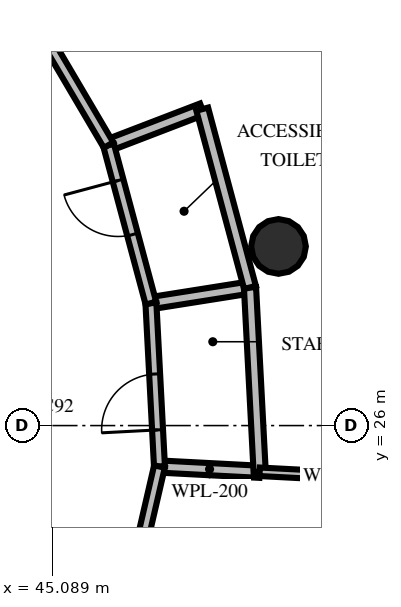
"""IFC4 building model, lengths in metres.
Left out: names, types, materials, properties, quantities, classifications, styles, units other than length and angle.
Written with IfcOpenShell. Run it as: python <this file> out.ifc"""

import sys

from ifc_helpers import new_model, si_unit, direction, frame, frame_2d, origin, origin_2d, place, context, subcontext, project, spatial, rectangle, circle, extrude, element, fill, save


model = new_model("IFC4")
c1 = context("Model", 3, precision=1e-05, world=origin(), true_north=direction((0.0, 1.0)))
c2 = subcontext(c1, "Body", "Model", "MODEL_VIEW")
j1 = project(units=[si_unit("LENGTHUNIT", "METRE"), si_unit("PLANEANGLEUNIT", "RADIAN")], contexts=[c1])
p1 = place(None, origin())
s1 = spatial("IfcSite", under=j1, at=p1, CompositionType="ELEMENT")
p2 = place(p1, origin())
s2 = spatial("IfcBuilding", under=s1, at=p2, CompositionType="ELEMENT")
p3 = place(p2, frame((0.0, 0.0, 266.4)))
s3 = spatial("IfcBuildingStorey", under=s2, at=p3, CompositionType="ELEMENT", Elevation=266.4)
p4 = place(p3, frame((48.81, 28.946, 0.0), z_axis=(0.0, 0.0, 1.0), x_axis=(1.0, 0.0, 0.0)))
e1 = element("IfcColumn", 1, at=p4, inside=s3, PredefinedType="COLUMN", context=c2, shape_type="SweptSolid", body=[
    extrude(circle(Radius=0.45, at=origin_2d()), origin(), (0.0, 0.0, 1.0), 3.6),
])
p5 = place(p3, frame((49.283, 20.423, 0.0), z_axis=(0.0, 0.0, 1.0), x_axis=(0.299202870459, 0.954189521169, 0.0)))
e2 = element("IfcWall", 2, at=p5, inside=s3, PredefinedType="SOLIDWALL", context=c2, shape_type="SweptSolid", body=[
    extrude(rectangle(XDim=7.115, YDim=0.3, at=frame_2d((3.558, 0.0))), origin(), (0.0, 0.0, 1.0), 2.76),
])
p6 = place(p5, frame((2.508, 0.0, 0.8)))
e3 = element("IfcOpeningElement", 3, at=p6, cuts=e2, PredefinedType="OPENING", context=c2, shape_type="SweptSolid", body=[
    extrude(rectangle(XDim=2.1, YDim=1.85, at=frame_2d((1.05, 0.925))), frame((0.0, 0.16, 0.0), z_axis=(0.0, -1.0, 0.0), x_axis=(1.0, 0.0, 0.0)), (0.0, 0.0, 1.0), 0.32),
])
p7 = place(p3, frame((46.852, 25.326, 0.0), z_axis=(0.0, 0.0, 1.0), x_axis=(0.998627214556, -0.052380209506, 0.0)))
e4 = element("IfcWall", 4, at=p7, inside=s3, PredefinedType="PLUMBINGWALL", context=c2, shape_type="SweptSolid", body=[
    extrude(rectangle(XDim=1.65, YDim=0.2, at=frame_2d((0.825, 0.0))), origin(), (0.0, 0.0, 1.0), 2.46),
])
p8 = place(p3, frame((46.711, 28.013, 0.0), z_axis=(0.0, 0.0, 1.0), x_axis=(0.987674038954, 0.156524735352, 0.0)))
e5 = element("IfcWall", 5, at=p8, inside=s3, PredefinedType="PLUMBINGWALL", context=c2, shape_type="SweptSolid", body=[
    extrude(rectangle(XDim=1.65, YDim=0.2, at=frame_2d((0.825, 0.0))), origin(), (0.0, 0.0, 1.0), 2.46),
])
p9 = place(p3, frame((48.5, 25.24, 0.0), z_axis=(0.0, 0.0, 1.0), x_axis=(-0.052276011793, 0.998632674506, 0.0)))
e6 = element("IfcWall", 6, at=p9, inside=s3, PredefinedType="PLUMBINGWALL", context=c2, shape_type="SweptSolid", body=[
    extrude(rectangle(XDim=3.036, YDim=0.2, at=frame_2d((1.518, 0.0))), origin(), (0.0, 0.0, 1.0), 2.46),
])
p10 = place(p3, frame((46.852, 25.326, 0.0), z_axis=(0.0, 0.0, 1.0), x_axis=(-0.052358796069, 0.998628337508, 0.0)))
e7 = element("IfcWall", 7, at=p10, inside=s3, PredefinedType="PARTITIONING", context=c2, shape_type="SweptSolid", body=[
    extrude(rectangle(XDim=2.69, YDim=0.18, at=frame_2d((1.345, 0.0))), origin(), (0.0, 0.0, 1.0), 2.46),
])
p11 = place(p10, frame((0.603, 0.0, 0.0)))
e8 = element("IfcOpeningElement", 8, at=p11, cuts=e7, PredefinedType="OPENING", context=c2, shape_type="SweptSolid", body=[
    extrude(rectangle(XDim=0.92, YDim=2.1, at=frame_2d((0.46, 1.05))), frame((0.0, 0.1, 0.0), z_axis=(0.0, -1.0, 0.0), x_axis=(1.0, 0.0, 0.0)), (0.0, 0.0, 1.0), 0.2),
])
p12 = place(p3, frame((46.015, 30.612, 0.0), z_axis=(0.0, 0.0, 1.0), x_axis=(0.933589438272, 0.358344472186, 0.0)))
e9 = element("IfcWall", 9, at=p12, inside=s3, PredefinedType="PLUMBINGWALL", context=c2, shape_type="SweptSolid", body=[
    extrude(rectangle(XDim=1.65, YDim=0.2, at=frame_2d((0.825, 0.0))), origin(), (0.0, 0.0, 1.0), 2.46),
])
p13 = place(p3, frame((48.341, 28.271, 0.0), z_axis=(0.0, 0.0, 1.0), x_axis=(-0.258813807271, 0.965927229747, 0.0)))
e10 = element("IfcWall", 10, at=p13, inside=s3, PredefinedType="PLUMBINGWALL", context=c2, shape_type="SweptSolid", body=[
    extrude(rectangle(XDim=3.036, YDim=0.2, at=frame_2d((1.518, 0.0))), origin(), (0.0, 0.0, 1.0), 2.46),
])
p14 = place(p3, frame((46.711, 28.013, 0.0), z_axis=(0.0, 0.0, 1.0), x_axis=(-0.258769343788, 0.965939142346, 0.0)))
e11 = element("IfcWall", 11, at=p14, inside=s3, PredefinedType="PARTITIONING", context=c2, shape_type="SweptSolid", body=[
    extrude(rectangle(XDim=2.691, YDim=0.18, at=frame_2d((1.345, 0.0))), origin(), (0.0, 0.0, 1.0), 2.46),
])
p15 = place(p14, frame((1.167, 0.0, 0.0)))
e12 = element("IfcOpeningElement", 12, at=p15, cuts=e11, PredefinedType="OPENING", context=c2, shape_type="SweptSolid", body=[
    extrude(rectangle(XDim=0.92, YDim=2.1, at=frame_2d((0.46, 1.05))), frame((0.0, 0.1, 0.0), z_axis=(0.0, -1.0, 0.0), x_axis=(1.0, 0.0, 0.0)), (0.0, 0.0, 1.0), 0.2),
])
p16 = place(p3, frame((48.5, 25.24, 0.0), z_axis=(0.0, 0.0, 1.0), x_axis=(0.998632746109, -0.052274643946, 0.0)))
e13 = element("IfcWall", 13, at=p16, inside=s3, PredefinedType="PARTITIONING", context=c2, shape_type="SweptSolid", body=[
    extrude(rectangle(XDim=2.48, YDim=0.14, at=frame_2d((1.24, 0.0))), origin(), (0.0, 0.0, 1.0), 2.46),
])
p17 = place(p3, frame((46.015, 30.612, 0.0), z_axis=(0.0, 0.0, 1.0), x_axis=(-0.50755747948, 0.861617899665, 0.0)))
e14 = element("IfcWall", 14, at=p17, inside=s3, PredefinedType="PARTITIONING", context=c2, shape_type="SweptSolid", body=[
    extrude(rectangle(XDim=4.248, YDim=0.18, at=frame_2d((2.124, 0.0))), origin(), (0.0, 0.0, 1.0), 2.46),
])
p18 = place(p3, frame((45.847, 20.971, 0.0), z_axis=(0.0, 0.0, 1.0), x_axis=(0.224927321525, 0.974375543634, 0.0)))
e15 = element("IfcWall", 15, at=p18, inside=s3, PredefinedType="PARTITIONING", context=c2, shape_type="SweptSolid", body=[
    extrude(rectangle(XDim=4.47, YDim=0.18, at=frame_2d((2.235, 0.0))), origin(), (0.0, 0.0, 1.0), 2.46),
])
p19 = place(p18, frame((0.942, 0.0, 0.0)))
e16 = element("IfcOpeningElement", 16, at=p19, cuts=e15, PredefinedType="OPENING", context=c2, shape_type="SweptSolid", body=[
    extrude(rectangle(XDim=1.0, YDim=2.15, at=frame_2d((0.5, 1.075))), frame((0.0, 0.1, 0.0), z_axis=(0.0, -1.0, 0.0), x_axis=(1.0, 0.0, 0.0)), (0.0, 0.0, 1.0), 0.2),
])
p20 = place(p11, origin())
e17 = element("IfcDoor", 17, at=p20, inside=s3, OperationType="SINGLE_SWING_LEFT", PredefinedType="DOOR", context=c2, shape_type="SweptSolid", body=[
    extrude(rectangle(XDim=0.92, YDim=2.1, at=frame_2d((0.46, 1.05))), frame((0.0, 0.025, 0.0), z_axis=(0.0, -1.0, 0.0), x_axis=(1.0, 0.0, 0.0)), (0.0, 0.0, 1.0), 0.05),
])
fill(e8, e17)
p21 = place(p15, origin())
e18 = element("IfcDoor", 18, at=p21, inside=s3, OperationType="SINGLE_SWING_RIGHT", PredefinedType="DOOR", context=c2, shape_type="SweptSolid", body=[
    extrude(rectangle(XDim=0.92, YDim=2.1, at=frame_2d((0.46, 1.05))), frame((0.0, 0.025, 0.0), z_axis=(0.0, -1.0, 0.0), x_axis=(1.0, 0.0, 0.0)), (0.0, 0.0, 1.0), 0.05),
])
fill(e12, e18)
save(model, sys.argv[1])
